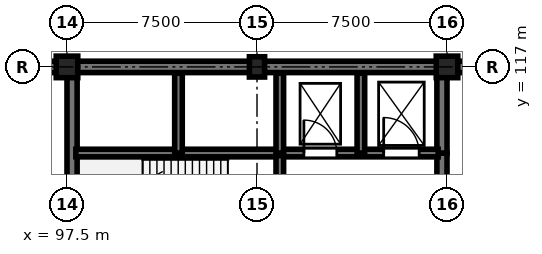
"""IFC4 building model, lengths in metres.
Left out: names, types, materials, properties, quantities, classifications, styles, units other than length and angle.
Written with IfcOpenShell. Run it as: python <this file> out.ifc"""

import sys

from ifc_helpers import new_model, si_unit, direction, frame, frame_2d, origin, origin_2d, place, context, subcontext, project, spatial, rectangle, extrude, element, fill, save


model = new_model("IFC4")
c1 = context("Model", 3, precision=1e-05, world=origin(), true_north=direction((0.0, 1.0)))
c2 = subcontext(c1, "Body", "Model", "MODEL_VIEW")
j1 = project(units=[si_unit("LENGTHUNIT", "METRE"), si_unit("PLANEANGLEUNIT", "RADIAN")], contexts=[c1])
p1 = place(None, origin())
s1 = spatial("IfcSite", under=j1, at=p1, CompositionType="ELEMENT")
p2 = place(p1, origin())
s2 = spatial("IfcBuilding", under=s1, at=p2, CompositionType="ELEMENT")
p3 = place(p2, frame((0.0, 0.0, -4.5)))
s3 = spatial("IfcBuildingStorey", under=s2, at=p3, CompositionType="ELEMENT", Elevation=-4.5)
p4 = place(p3, frame((97.5, 117.0, 0.0), z_axis=(0.0, 0.0, 1.0), x_axis=(1.0, 0.0, 0.0)))
e1 = element("IfcColumn", 1, at=p4, inside=s3, PredefinedType="COLUMN", context=c2, shape_type="SweptSolid", body=[
    extrude(rectangle(XDim=0.85, YDim=0.85, at=origin_2d()), origin(), (0.0, 0.0, 1.0), 4.5),
])
p5 = place(p3, frame((105.0, 117.0, 0.0), z_axis=(0.0, 0.0, 1.0), x_axis=(1.0, 0.0, 0.0)))
e2 = element("IfcColumn", 2, at=p5, inside=s3, PredefinedType="COLUMN", context=c2, shape_type="SweptSolid", body=[
    extrude(rectangle(XDim=0.6, YDim=0.8, at=origin_2d()), origin(), (0.0, 0.0, 1.0), 4.5),
])
p6 = place(p3, frame((112.5, 117.0, 0.0), z_axis=(0.0, 0.0, 1.0), x_axis=(1.0, 0.0, 0.0)))
e3 = element("IfcColumn", 3, at=p6, inside=s3, PredefinedType="COLUMN", context=c2, shape_type="SweptSolid", body=[
    extrude(rectangle(XDim=0.85, YDim=0.85, at=origin_2d()), origin(), (0.0, 0.0, 1.0), 4.5),
])
for number, where, z_axis, x_axis in (
    (4, (90.0, 117.0, 0.0), (0.0, 0.0, 1.0), (1.0, 0.0, 0.0)),
    (5, (97.5, 117.0, 0.0), (0.0, 0.0, 1.0), (1.0, 0.0, 0.0)),
    (6, (105.0, 117.0, 0.0), (0.0, 0.0, 1.0), (1.0, 0.0, 0.0)),
    (7, (112.5, 117.0, 0.0), (0.0, 0.0, 1.0), (1.0, 0.0, 0.0)),
):
    element("IfcWall", number, at=place(p3, frame(where, z_axis=z_axis, x_axis=x_axis)), inside=s3, PredefinedType="SOLIDWALL", context=c2, shape_type="SweptSolid", body=[
        extrude(rectangle(XDim=7.5, YDim=0.45, at=frame_2d((3.75, 0.0))), origin(), (0.0, 0.0, 1.0), 4.14),
    ])
p7 = place(p3, frame((97.7, 109.85, 0.0), z_axis=(0.0, 0.0, 1.0), x_axis=(0.0, 1.0, 0.0)))
e8 = element("IfcWall", 8, at=p7, inside=s3, PredefinedType="SHEAR", context=c2, shape_type="SweptSolid", body=[
    extrude(rectangle(XDim=6.8, YDim=0.4, at=frame_2d((3.4, 0.0))), origin(), (0.0, 0.0, 1.0), 4.14),
])
p8 = place(p3, frame((112.3, 109.85, 0.0), z_axis=(0.0, 0.0, 1.0), x_axis=(0.0, 1.0, 0.0)))
e9 = element("IfcWall", 9, at=p8, inside=s3, PredefinedType="SHEAR", context=c2, shape_type="SweptSolid", body=[
    extrude(rectangle(XDim=3.75, YDim=0.4, at=frame_2d((1.875, 0.0))), origin(), (0.0, 0.0, 1.0), 4.14),
])
p9 = place(p3, frame((112.3, 113.6, 0.0), z_axis=(0.0, 0.0, 1.0), x_axis=(0.0, 1.0, 0.0)))
e10 = element("IfcWall", 10, at=p9, inside=s3, PredefinedType="SHEAR", context=c2, shape_type="SweptSolid", body=[
    extrude(rectangle(XDim=3.05, YDim=0.4, at=frame_2d((1.525, 0.0))), origin(), (0.0, 0.0, 1.0), 4.14),
])
p10 = place(p3, frame((97.85, 113.6, 0.0), z_axis=(0.0, 0.0, 1.0), x_axis=(1.0, 0.0, 0.0)))
e11 = element("IfcWall", 11, at=p10, inside=s3, PredefinedType="SHEAR", context=c2, shape_type="SweptSolid", body=[
    extrude(rectangle(XDim=8.05, YDim=0.3, at=frame_2d((4.025, 0.0))), origin(), (0.0, 0.0, 1.0), 4.14),
])
p11 = place(p3, frame((105.9, 113.6, 0.0), z_axis=(0.0, 0.0, 1.0), x_axis=(1.0, 0.0, 0.0)))
e12 = element("IfcWall", 12, at=p11, inside=s3, PredefinedType="SHEAR", context=c2, shape_type="SweptSolid", body=[
    extrude(rectangle(XDim=6.25, YDim=0.3, at=frame_2d((3.125, 0.0))), origin(), (0.0, 0.0, 1.0), 4.14),
])
p12 = place(p11, frame((0.95, 0.0, 0.0)))
e13 = element("IfcOpeningElement", 13, at=p12, cuts=e12, PredefinedType="OPENING", context=c2, shape_type="SweptSolid", body=[
    extrude(rectangle(XDim=1.3, YDim=2.2, at=frame_2d((0.65, 1.1))), frame((0.0, 0.16, 0.0), z_axis=(0.0, -1.0, 0.0), x_axis=(1.0, 0.0, 0.0)), (0.0, 0.0, 1.0), 0.32),
])
p13 = place(p11, frame((4.1, 0.0, 0.0)))
e14 = element("IfcOpeningElement", 14, at=p13, cuts=e12, PredefinedType="OPENING", context=c2, shape_type="SweptSolid", body=[
    extrude(rectangle(XDim=1.4, YDim=2.25, at=frame_2d((0.7, 1.125))), frame((0.0, 0.16, 0.0), z_axis=(0.0, -1.0, 0.0), x_axis=(1.0, 0.0, 0.0)), (0.0, 0.0, 1.0), 0.32),
])
p14 = place(p3, frame((105.9, 113.5, 0.0), z_axis=(0.0, 0.0, 1.0), x_axis=(0.0, -1.0, 0.0)))
e15 = element("IfcWall", 15, at=p14, inside=s3, PredefinedType="SHEAR", context=c2, shape_type="SweptSolid", body=[
    extrude(rectangle(XDim=3.65, YDim=0.3, at=frame_2d((1.825, 0.0))), origin(), (0.0, 0.0, 1.0), 4.14),
])
p15 = place(p14, frame((1.22, 0.0, 0.0)))
e16 = element("IfcOpeningElement", 16, at=p15, cuts=e15, PredefinedType="OPENING", context=c2, shape_type="SweptSolid", body=[
    extrude(rectangle(XDim=1.2, YDim=2.25, at=frame_2d((0.6, 1.125))), frame((0.0, 0.16, 0.0), z_axis=(0.0, -1.0, 0.0), x_axis=(1.0, 0.0, 0.0)), (0.0, 0.0, 1.0), 0.32),
])
for number, where, z_axis, x_axis in (
    (17, (101.9, 113.6, 0.0), (0.0, 0.0, 1.0), (0.0, 1.0, 0.0)),
    (18, (105.9, 113.6, 0.0), (0.0, 0.0, 1.0), (0.0, 1.0, 0.0)),
    (19, (109.1, 113.6, 0.0), (0.0, 0.0, 1.0), (0.0, 1.0, 0.0)),
):
    element("IfcWall", number, at=place(p3, frame(where, z_axis=z_axis, x_axis=x_axis)), inside=s3, PredefinedType="SHEAR", context=c2, shape_type="SweptSolid", body=[
        extrude(rectangle(XDim=3.15, YDim=0.3, at=frame_2d((1.575, 0.0))), origin(), (0.0, 0.0, 1.0), 4.14),
    ])
p16 = place(p12, origin())
e20 = element("IfcDoor", 20, at=p16, inside=s3, OperationType="DOUBLE_DOOR_SLIDING", PredefinedType="DOOR", context=c2, shape_type="SweptSolid", body=[
    extrude(rectangle(XDim=1.3, YDim=2.2, at=frame_2d((0.65, 1.1))), frame((0.0, 0.025, 0.0), z_axis=(0.0, -1.0, 0.0), x_axis=(1.0, 0.0, 0.0)), (0.0, 0.0, 1.0), 0.05),
])
fill(e13, e20)
p17 = place(p13, origin())
e21 = element("IfcDoor", 21, at=p17, inside=s3, OperationType="DOUBLE_DOOR_SLIDING", PredefinedType="DOOR", context=c2, shape_type="SweptSolid", body=[
    extrude(rectangle(XDim=1.4, YDim=2.25, at=frame_2d((0.7, 1.125))), frame((0.0, 0.025, 0.0), z_axis=(0.0, -1.0, 0.0), x_axis=(1.0, 0.0, 0.0)), (0.0, 0.0, 1.0), 0.05),
])
fill(e14, e21)
save(model, sys.argv[1])
